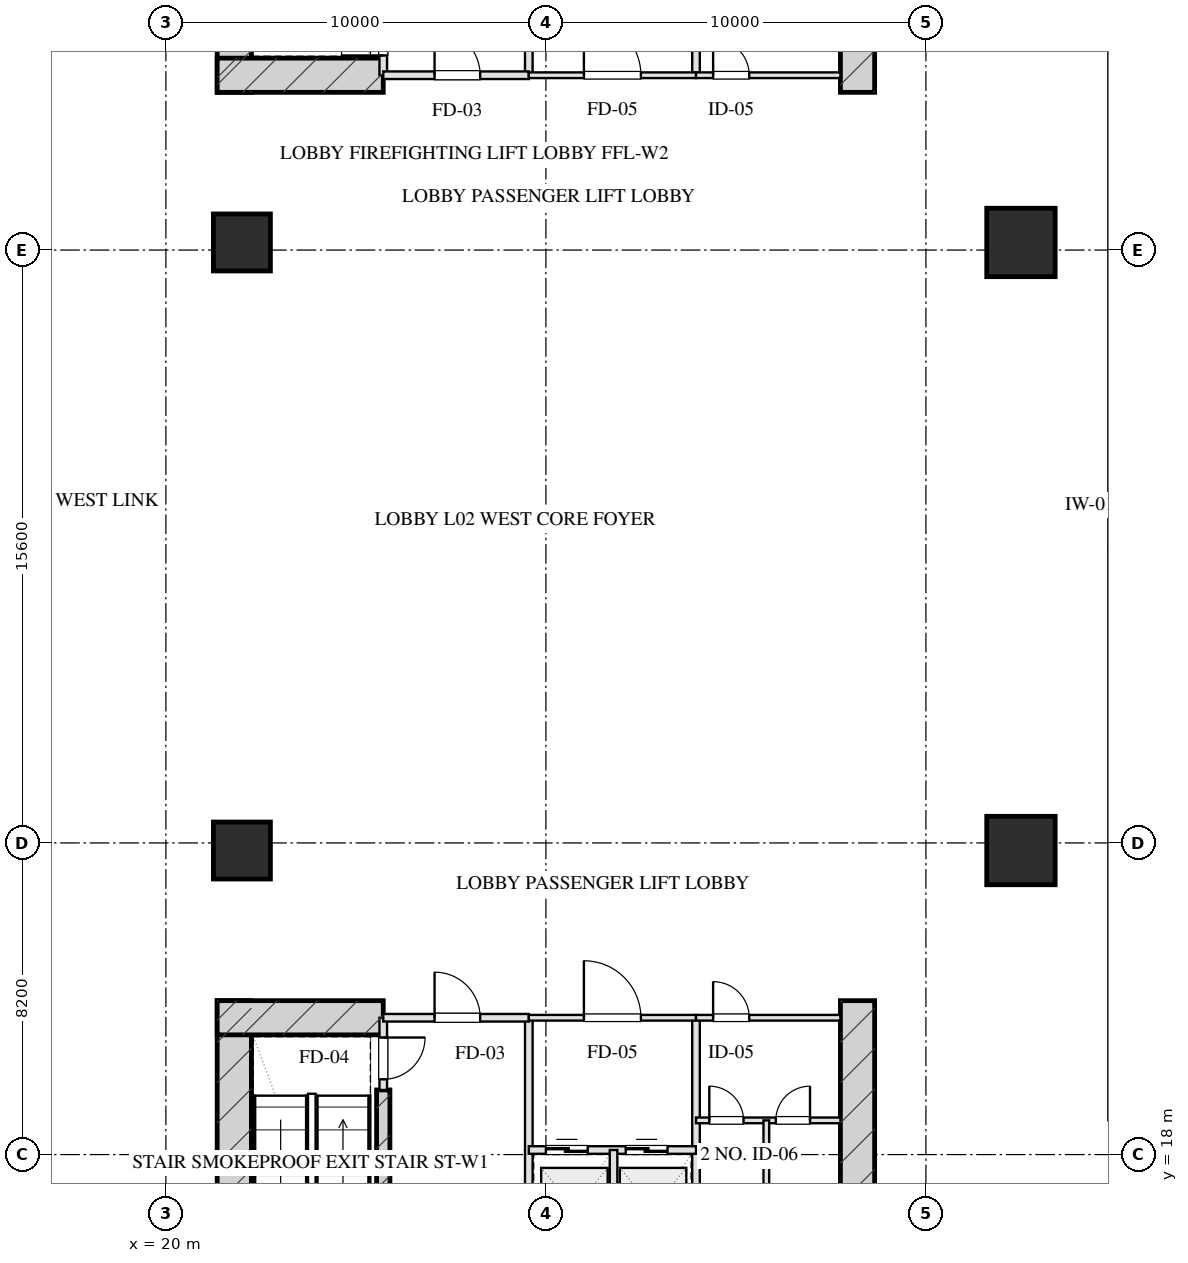
"""IFC4 building model, lengths in metres.
Left out: names, types, materials, properties, quantities, classifications, styles, units other than length and angle.
Written with IfcOpenShell. Run it as: python <this file> out.ifc"""

import sys

from ifc_helpers import new_model, si_unit, direction, frame, frame_2d, origin, origin_2d, place, context, subcontext, project, spatial, rectangle, hollow_rectangle, extrude, element, fill, save


model = new_model("IFC4")
c1 = context("Model", 3, precision=1e-05, world=origin(), true_north=direction((0.0, 1.0)))
c2 = subcontext(c1, "Body", "Model", "MODEL_VIEW")
j1 = project(units=[si_unit("LENGTHUNIT", "METRE"), si_unit("PLANEANGLEUNIT", "RADIAN")], contexts=[c1])
p1 = place(None, origin())
s1 = spatial("IfcSite", under=j1, at=p1, CompositionType="ELEMENT")
p2 = place(p1, origin())
s2 = spatial("IfcBuilding", under=s1, at=p2, CompositionType="ELEMENT")
p3 = place(p2, frame((0.0, 0.0, 11.5)))
s3 = spatial("IfcBuildingStorey", under=s2, at=p3, CompositionType="ELEMENT", Elevation=11.5)
for number, where, z_axis, x_axis in (
    (1, (21.8, 22.05, 0.0), (0.0, 0.0, 1.0), (0.0, -1.0, 0.0)),
    (2, (38.2, 22.05, 0.0), (0.0, 0.0, 1.0), (0.0, -1.0, 0.0)),
):
    element("IfcWall", number, at=place(p3, frame(where, z_axis=z_axis, x_axis=x_axis)), inside=s3, PredefinedType="SHEAR", context=c2, shape_type="SweptSolid", body=[
        extrude(rectangle(XDim=9.78, YDim=0.9, at=frame_2d((4.89, 0.0))), origin(), (0.0, 0.0, 1.0), 5.0),
    ])
p4 = place(p3, frame((25.72, 19.7, 0.0), z_axis=(0.0, 0.0, 1.0), x_axis=(0.0, -1.0, 0.0)))
e3 = element("IfcWall", 3, at=p4, inside=s3, PredefinedType="SHEAR", context=c2, shape_type="SweptSolid", body=[
    extrude(rectangle(XDim=6.98, YDim=0.35, at=frame_2d((3.49, 0.0))), origin(), (0.0, 0.0, 1.0), 5.0),
])
p5 = place(p3, frame((21.35, 21.6, 0.0), z_axis=(0.0, 0.0, 1.0), x_axis=(1.0, 0.0, 0.0)))
e4 = element("IfcWall", 4, at=p5, inside=s3, PredefinedType="SHEAR", context=c2, shape_type="SweptSolid", body=[
    extrude(rectangle(XDim=4.37, YDim=0.9, at=frame_2d((2.185, 0.0))), origin(), (0.0, 0.0, 1.0), 5.0),
])
for number, where, z_axis, x_axis in (
    (5, (21.8, 45.95, 0.0), (0.0, 0.0, 1.0), (0.0, 1.0, 0.0)),
    (6, (38.2, 45.95, 0.0), (0.0, 0.0, 1.0), (0.0, 1.0, 0.0)),
):
    element("IfcWall", number, at=place(p3, frame(where, z_axis=z_axis, x_axis=x_axis)), inside=s3, PredefinedType="SHEAR", context=c2, shape_type="SweptSolid", body=[
        extrude(rectangle(XDim=9.78, YDim=0.9, at=frame_2d((4.89, 0.0))), origin(), (0.0, 0.0, 1.0), 5.0),
    ])
p6 = place(p3, frame((21.35, 46.4, 0.0), z_axis=(0.0, 0.0, 1.0), x_axis=(1.0, 0.0, 0.0)))
e7 = element("IfcWall", 7, at=p6, inside=s3, PredefinedType="SHEAR", context=c2, shape_type="SweptSolid", body=[
    extrude(rectangle(XDim=4.37, YDim=0.9, at=frame_2d((2.185, 0.0))), origin(), (0.0, 0.0, 1.0), 5.0),
])
for number, where, z_axis, x_axis in (
    (8, (22.0, 26.0, 0.0), (0.0, 0.0, 1.0), (1.0, 0.0, 0.0)),
    (9, (22.0, 42.0, 0.0), (0.0, 0.0, 1.0), (1.0, 0.0, 0.0)),
):
    element("IfcColumn", number, at=place(p3, frame(where, z_axis=z_axis, x_axis=x_axis)), inside=s3, PredefinedType="COLUMN", context=c2, shape_type="SweptSolid", body=[
        extrude(rectangle(XDim=1.5, YDim=1.5, at=origin_2d()), origin(), (0.0, 0.0, 1.0), 5.001),
    ])
for number, where, z_axis, x_axis in (
    (10, (42.5, 26.0, 0.0), (0.0, 0.0, 1.0), (1.0, 0.0, 0.0)),
    (11, (42.5, 42.0, 0.0), (0.0, 0.0, 1.0), (1.0, 0.0, 0.0)),
):
    element("IfcColumn", number, at=place(p3, frame(where, z_axis=z_axis, x_axis=x_axis)), inside=s3, PredefinedType="COLUMN", context=c2, shape_type="SweptSolid", body=[
        extrude(hollow_rectangle(XDim=1.8, YDim=1.8, WallThickness=0.06, at=origin_2d()), origin(), (0.0, 0.0, 1.0), 5.001),
    ])
p7 = place(p3, frame((25.72, 21.6, 0.0), z_axis=(0.0, 0.0, 1.0), x_axis=(0.0, -1.0, 0.0)))
e12 = element("IfcWall", 12, at=p7, inside=s3, PredefinedType="PARTITIONING", context=c2, shape_type="SweptSolid", body=[
    extrude(rectangle(XDim=1.9, YDim=0.2, at=frame_2d((0.95, 0.0))), origin(), (0.0, 0.0, 1.0), 4.685),
])
p8 = place(p7, frame((0.52, 0.0, 0.0)))
e13 = element("IfcOpeningElement", 13, at=p8, cuts=e12, PredefinedType="OPENING", context=c2, shape_type="SweptSolid", body=[
    extrude(rectangle(XDim=1.1, YDim=2.05, at=frame_2d((0.55, 1.025))), frame((0.0, 0.11, 0.0), z_axis=(0.0, -1.0, 0.0), x_axis=(1.0, 0.0, 0.0)), (0.0, 0.0, 1.0), 0.22),
])
p9 = place(p3, frame((29.55, 21.6, 0.0), z_axis=(0.0, 0.0, 1.0), x_axis=(0.0, -1.0, 0.0)))
e14 = element("IfcWall", 14, at=p9, inside=s3, PredefinedType="PARTITIONING", context=c2, shape_type="SweptSolid", body=[
    extrude(rectangle(XDim=8.43, YDim=0.2, at=frame_2d((4.215, 0.0))), origin(), (0.0, 0.0, 1.0), 4.685),
])
p10 = place(p3, frame((25.72, 21.6, 0.0), z_axis=(0.0, 0.0, 1.0), x_axis=(1.0, 0.0, 0.0)))
e15 = element("IfcWall", 15, at=p10, inside=s3, PredefinedType="PARTITIONING", context=c2, shape_type="SweptSolid", body=[
    extrude(rectangle(XDim=3.83, YDim=0.2, at=frame_2d((1.915, 0.0))), origin(), (0.0, 0.0, 1.0), 4.685),
])
p11 = place(p10, frame((1.35, 0.0, 0.0)))
e16 = element("IfcOpeningElement", 16, at=p11, cuts=e15, PredefinedType="OPENING", context=c2, shape_type="SweptSolid", body=[
    extrude(rectangle(XDim=1.2, YDim=2.05, at=frame_2d((0.6, 1.025))), frame((0.0, 0.11, 0.0), z_axis=(0.0, -1.0, 0.0), x_axis=(1.0, 0.0, 0.0)), (0.0, 0.0, 1.0), 0.22),
])
p12 = place(p3, frame((33.95, 21.6, 0.0), z_axis=(0.0, 0.0, 1.0), x_axis=(0.0, -1.0, 0.0)))
e17 = element("IfcWall", 17, at=p12, inside=s3, PredefinedType="PARTITIONING", context=c2, shape_type="SweptSolid", body=[
    extrude(rectangle(XDim=8.43, YDim=0.2, at=frame_2d((4.215, 0.0))), origin(), (0.0, 0.0, 1.0), 4.685),
])
p13 = place(p3, frame((29.55, 21.6, 0.0), z_axis=(0.0, 0.0, 1.0), x_axis=(1.0, 0.0, 0.0)))
e18 = element("IfcWall", 18, at=p13, inside=s3, PredefinedType="PARTITIONING", context=c2, shape_type="SweptSolid", body=[
    extrude(rectangle(XDim=4.4, YDim=0.15, at=frame_2d((2.2, 0.0))), origin(), (0.0, 0.0, 1.0), 4.685),
])
p14 = place(p13, frame((1.45, 0.0, 0.0)))
e19 = element("IfcOpeningElement", 19, at=p14, cuts=e18, PredefinedType="OPENING", context=c2, shape_type="SweptSolid", body=[
    extrude(rectangle(XDim=1.5, YDim=2.05, at=frame_2d((0.75, 1.025))), frame((0.0, 0.085, 0.0), z_axis=(0.0, -1.0, 0.0), x_axis=(1.0, 0.0, 0.0)), (0.0, 0.0, 1.0), 0.17),
])
p15 = place(p3, frame((29.55, 18.12, 0.0), z_axis=(0.0, 0.0, 1.0), x_axis=(1.0, 0.0, 0.0)))
e20 = element("IfcWall", 20, at=p15, inside=s3, PredefinedType="PARTITIONING", context=c2, shape_type="SweptSolid", body=[
    extrude(rectangle(XDim=4.4, YDim=0.2, at=frame_2d((2.2, 0.0))), origin(), (0.0, 0.0, 1.0), 4.685),
])
p16 = place(p15, frame((0.45, 0.0, 0.0)))
e21 = element("IfcOpeningElement", 21, at=p16, cuts=e20, PredefinedType="OPENING", context=c2, shape_type="SweptSolid", body=[
    extrude(rectangle(XDim=1.1, YDim=2.05, at=frame_2d((0.55, 1.025))), frame((0.0, 0.11, 0.0), z_axis=(0.0, -1.0, 0.0), x_axis=(1.0, 0.0, 0.0)), (0.0, 0.0, 1.0), 0.22),
])
p17 = place(p15, frame((2.55, 0.0, 0.0)))
e22 = element("IfcOpeningElement", 22, at=p17, cuts=e20, PredefinedType="OPENING", context=c2, shape_type="SweptSolid", body=[
    extrude(rectangle(XDim=1.1, YDim=2.05, at=frame_2d((0.55, 1.025))), frame((0.0, 0.11, 0.0), z_axis=(0.0, -1.0, 0.0), x_axis=(1.0, 0.0, 0.0)), (0.0, 0.0, 1.0), 0.22),
])
p18 = place(p3, frame((31.78, 18.12, 0.0), z_axis=(0.0, 0.0, 1.0), x_axis=(0.0, -1.0, 0.0)))
e23 = element("IfcWall", 23, at=p18, inside=s3, PredefinedType="PARTITIONING", context=c2, shape_type="SweptSolid", body=[
    extrude(rectangle(XDim=4.95, YDim=0.2, at=frame_2d((2.475, 0.0))), origin(), (0.0, 0.0, 1.0), 4.685),
])
p19 = place(p3, frame((33.95, 21.6, 0.0), z_axis=(0.0, 0.0, 1.0), x_axis=(1.0, 0.0, 0.0)))
e24 = element("IfcWall", 24, at=p19, inside=s3, PredefinedType="PARTITIONING", context=c2, shape_type="SweptSolid", body=[
    extrude(rectangle(XDim=3.8, YDim=0.15, at=frame_2d((1.9, 0.0))), origin(), (0.0, 0.0, 1.0), 4.685),
])
p20 = place(p19, frame((0.45, 0.0, 0.0)))
e25 = element("IfcOpeningElement", 25, at=p20, cuts=e24, PredefinedType="OPENING", context=c2, shape_type="SweptSolid", body=[
    extrude(rectangle(XDim=0.95, YDim=2.05, at=frame_2d((0.475, 1.025))), frame((0.0, 0.085, 0.0), z_axis=(0.0, -1.0, 0.0), x_axis=(1.0, 0.0, 0.0)), (0.0, 0.0, 1.0), 0.17),
])
p21 = place(p3, frame((33.95, 18.9, 0.0), z_axis=(0.0, 0.0, 1.0), x_axis=(1.0, 0.0, 0.0)))
e26 = element("IfcWall", 26, at=p21, inside=s3, PredefinedType="PARTITIONING", context=c2, shape_type="SweptSolid", body=[
    extrude(rectangle(XDim=3.8, YDim=0.15, at=frame_2d((1.9, 0.0))), origin(), (0.0, 0.0, 1.0), 4.685),
])
p22 = place(p21, frame((0.35, 0.0, 0.0)))
e27 = element("IfcOpeningElement", 27, at=p22, cuts=e26, PredefinedType="OPENING", context=c2, shape_type="SweptSolid", body=[
    extrude(rectangle(XDim=0.9, YDim=2.05, at=frame_2d((0.45, 1.025))), frame((0.0, 0.085, 0.0), z_axis=(0.0, -1.0, 0.0), x_axis=(1.0, 0.0, 0.0)), (0.0, 0.0, 1.0), 0.17),
])
p23 = place(p21, frame((2.1, 0.0, 0.0)))
e28 = element("IfcOpeningElement", 28, at=p23, cuts=e26, PredefinedType="OPENING", context=c2, shape_type="SweptSolid", body=[
    extrude(rectangle(XDim=0.9, YDim=2.05, at=frame_2d((0.45, 1.025))), frame((0.0, 0.085, 0.0), z_axis=(0.0, -1.0, 0.0), x_axis=(1.0, 0.0, 0.0)), (0.0, 0.0, 1.0), 0.17),
])
p24 = place(p3, frame((35.8, 18.9, 0.0), z_axis=(0.0, 0.0, 1.0), x_axis=(0.0, -1.0, 0.0)))
e29 = element("IfcWall", 29, at=p24, inside=s3, PredefinedType="PARTITIONING", context=c2, shape_type="SweptSolid", body=[
    extrude(rectangle(XDim=5.73, YDim=0.15, at=frame_2d((2.865, 0.0))), origin(), (0.0, 0.0, 1.0), 4.685),
])
p25 = place(p3, frame((25.72, 46.4, 0.0), z_axis=(0.0, 0.0, 1.0), x_axis=(0.0, 1.0, 0.0)))
e30 = element("IfcWall", 30, at=p25, inside=s3, PredefinedType="PARTITIONING", context=c2, shape_type="SweptSolid", body=[
    extrude(rectangle(XDim=1.9, YDim=0.2, at=frame_2d((0.95, 0.0))), origin(), (0.0, 0.0, 1.0), 4.685),
])
p26 = place(p25, frame((0.52, 0.0, 0.0)))
e31 = element("IfcOpeningElement", 31, at=p26, cuts=e30, PredefinedType="OPENING", context=c2, shape_type="SweptSolid", body=[
    extrude(rectangle(XDim=1.1, YDim=2.05, at=frame_2d((0.55, 1.025))), frame((0.0, 0.11, 0.0), z_axis=(0.0, -1.0, 0.0), x_axis=(1.0, 0.0, 0.0)), (0.0, 0.0, 1.0), 0.22),
])
p27 = place(p3, frame((29.55, 46.4, 0.0), z_axis=(0.0, 0.0, 1.0), x_axis=(0.0, 1.0, 0.0)))
e32 = element("IfcWall", 32, at=p27, inside=s3, PredefinedType="PARTITIONING", context=c2, shape_type="SweptSolid", body=[
    extrude(rectangle(XDim=8.43, YDim=0.2, at=frame_2d((4.215, 0.0))), origin(), (0.0, 0.0, 1.0), 4.685),
])
p28 = place(p3, frame((25.72, 46.4, 0.0), z_axis=(0.0, 0.0, 1.0), x_axis=(1.0, 0.0, 0.0)))
e33 = element("IfcWall", 33, at=p28, inside=s3, PredefinedType="PARTITIONING", context=c2, shape_type="SweptSolid", body=[
    extrude(rectangle(XDim=3.83, YDim=0.2, at=frame_2d((1.915, 0.0))), origin(), (0.0, 0.0, 1.0), 4.685),
])
p29 = place(p28, frame((1.35, 0.0, 0.0)))
e34 = element("IfcOpeningElement", 34, at=p29, cuts=e33, PredefinedType="OPENING", context=c2, shape_type="SweptSolid", body=[
    extrude(rectangle(XDim=1.2, YDim=2.05, at=frame_2d((0.6, 1.025))), frame((0.0, 0.11, 0.0), z_axis=(0.0, -1.0, 0.0), x_axis=(1.0, 0.0, 0.0)), (0.0, 0.0, 1.0), 0.22),
])
p30 = place(p3, frame((33.95, 46.4, 0.0), z_axis=(0.0, 0.0, 1.0), x_axis=(0.0, 1.0, 0.0)))
e35 = element("IfcWall", 35, at=p30, inside=s3, PredefinedType="PARTITIONING", context=c2, shape_type="SweptSolid", body=[
    extrude(rectangle(XDim=8.43, YDim=0.2, at=frame_2d((4.215, 0.0))), origin(), (0.0, 0.0, 1.0), 4.685),
])
p31 = place(p3, frame((29.55, 46.4, 0.0), z_axis=(0.0, 0.0, 1.0), x_axis=(1.0, 0.0, 0.0)))
e36 = element("IfcWall", 36, at=p31, inside=s3, PredefinedType="PARTITIONING", context=c2, shape_type="SweptSolid", body=[
    extrude(rectangle(XDim=4.4, YDim=0.15, at=frame_2d((2.2, 0.0))), origin(), (0.0, 0.0, 1.0), 4.685),
])
p32 = place(p31, frame((1.45, 0.0, 0.0)))
e37 = element("IfcOpeningElement", 37, at=p32, cuts=e36, PredefinedType="OPENING", context=c2, shape_type="SweptSolid", body=[
    extrude(rectangle(XDim=1.5, YDim=2.05, at=frame_2d((0.75, 1.025))), frame((0.0, 0.085, 0.0), z_axis=(0.0, -1.0, 0.0), x_axis=(1.0, 0.0, 0.0)), (0.0, 0.0, 1.0), 0.17),
])
p33 = place(p3, frame((33.95, 46.4, 0.0), z_axis=(0.0, 0.0, 1.0), x_axis=(1.0, 0.0, 0.0)))
e38 = element("IfcWall", 38, at=p33, inside=s3, PredefinedType="PARTITIONING", context=c2, shape_type="SweptSolid", body=[
    extrude(rectangle(XDim=3.8, YDim=0.15, at=frame_2d((1.9, 0.0))), origin(), (0.0, 0.0, 1.0), 4.685),
])
p34 = place(p33, frame((0.45, 0.0, 0.0)))
e39 = element("IfcOpeningElement", 39, at=p34, cuts=e38, PredefinedType="OPENING", context=c2, shape_type="SweptSolid", body=[
    extrude(rectangle(XDim=0.95, YDim=2.05, at=frame_2d((0.475, 1.025))), frame((0.0, 0.085, 0.0), z_axis=(0.0, -1.0, 0.0), x_axis=(1.0, 0.0, 0.0)), (0.0, 0.0, 1.0), 0.17),
])
p35 = place(p3, frame((44.9, 18.9, 0.0), z_axis=(0.0, 0.0, 1.0), x_axis=(0.0, 1.0, 0.0)))
e40 = element("IfcWall", 40, at=p35, inside=s3, PredefinedType="PARTITIONING", context=c2, shape_type="SweptSolid", body=[
    extrude(rectangle(XDim=30.2, YDim=0.2, at=frame_2d((15.1, 0.0))), origin(), (0.0, 0.0, 1.0), 4.685),
])
p36 = place(p8, origin())
e41 = element("IfcDoor", 41, at=p36, inside=s3, OperationType="SINGLE_SWING_LEFT", PredefinedType="DOOR", context=c2, shape_type="SweptSolid", body=[
    extrude(rectangle(XDim=1.1, YDim=2.05, at=frame_2d((0.55, 1.025))), frame((0.0, 0.025, 0.0), z_axis=(0.0, -1.0, 0.0), x_axis=(1.0, 0.0, 0.0)), (0.0, 0.0, 1.0), 0.05),
])
fill(e13, e41)
p37 = place(p11, origin())
e42 = element("IfcDoor", 42, at=p37, inside=s3, OperationType="SINGLE_SWING_LEFT", PredefinedType="DOOR", context=c2, shape_type="SweptSolid", body=[
    extrude(rectangle(XDim=1.2, YDim=2.05, at=frame_2d((0.6, 1.025))), frame((0.0, 0.025, 0.0), z_axis=(0.0, -1.0, 0.0), x_axis=(1.0, 0.0, 0.0)), (0.0, 0.0, 1.0), 0.05),
])
fill(e16, e42)
p38 = place(p14, origin())
e43 = element("IfcDoor", 43, at=p38, inside=s3, OperationType="SINGLE_SWING_LEFT", PredefinedType="DOOR", context=c2, shape_type="SweptSolid", body=[
    extrude(rectangle(XDim=1.5, YDim=2.05, at=frame_2d((0.75, 1.025))), frame((0.0, 0.025, 0.0), z_axis=(0.0, -1.0, 0.0), x_axis=(1.0, 0.0, 0.0)), (0.0, 0.0, 1.0), 0.05),
])
fill(e19, e43)
p39 = place(p16, origin())
e44 = element("IfcDoor", 44, at=p39, inside=s3, OperationType="DOUBLE_DOOR_SLIDING", PredefinedType="DOOR", context=c2, shape_type="SweptSolid", body=[
    extrude(rectangle(XDim=1.1, YDim=2.05, at=frame_2d((0.55, 1.025))), frame((0.0, 0.025, 0.0), z_axis=(0.0, -1.0, 0.0), x_axis=(1.0, 0.0, 0.0)), (0.0, 0.0, 1.0), 0.05),
])
fill(e21, e44)
p40 = place(p17, origin())
e45 = element("IfcDoor", 45, at=p40, inside=s3, OperationType="DOUBLE_DOOR_SLIDING", PredefinedType="DOOR", context=c2, shape_type="SweptSolid", body=[
    extrude(rectangle(XDim=1.1, YDim=2.05, at=frame_2d((0.55, 1.025))), frame((0.0, 0.025, 0.0), z_axis=(0.0, -1.0, 0.0), x_axis=(1.0, 0.0, 0.0)), (0.0, 0.0, 1.0), 0.05),
])
fill(e22, e45)
p41 = place(p20, origin())
e46 = element("IfcDoor", 46, at=p41, inside=s3, OperationType="SINGLE_SWING_LEFT", PredefinedType="DOOR", context=c2, shape_type="SweptSolid", body=[
    extrude(rectangle(XDim=0.95, YDim=2.05, at=frame_2d((0.475, 1.025))), frame((0.0, 0.025, 0.0), z_axis=(0.0, -1.0, 0.0), x_axis=(1.0, 0.0, 0.0)), (0.0, 0.0, 1.0), 0.05),
])
fill(e25, e46)
p42 = place(p22, origin())
e47 = element("IfcDoor", 47, at=p42, inside=s3, OperationType="SINGLE_SWING_LEFT", PredefinedType="DOOR", context=c2, shape_type="SweptSolid", body=[
    extrude(rectangle(XDim=0.9, YDim=2.05, at=frame_2d((0.45, 1.025))), frame((0.0, 0.025, 0.0), z_axis=(0.0, -1.0, 0.0), x_axis=(1.0, 0.0, 0.0)), (0.0, 0.0, 1.0), 0.05),
])
fill(e27, e47)
p43 = place(p23, origin())
e48 = element("IfcDoor", 48, at=p43, inside=s3, OperationType="SINGLE_SWING_RIGHT", PredefinedType="DOOR", context=c2, shape_type="SweptSolid", body=[
    extrude(rectangle(XDim=0.9, YDim=2.05, at=frame_2d((0.45, 1.025))), frame((0.0, 0.025, 0.0), z_axis=(0.0, -1.0, 0.0), x_axis=(1.0, 0.0, 0.0)), (0.0, 0.0, 1.0), 0.05),
])
fill(e28, e48)
p44 = place(p26, origin())
e49 = element("IfcDoor", 49, at=p44, inside=s3, OperationType="SINGLE_SWING_LEFT", PredefinedType="DOOR", context=c2, shape_type="SweptSolid", body=[
    extrude(rectangle(XDim=1.1, YDim=2.05, at=frame_2d((0.55, 1.025))), frame((0.0, 0.025, 0.0), z_axis=(0.0, -1.0, 0.0), x_axis=(1.0, 0.0, 0.0)), (0.0, 0.0, 1.0), 0.05),
])
fill(e31, e49)
p45 = place(p29, origin())
e50 = element("IfcDoor", 50, at=p45, inside=s3, OperationType="SINGLE_SWING_LEFT", PredefinedType="DOOR", context=c2, shape_type="SweptSolid", body=[
    extrude(rectangle(XDim=1.2, YDim=2.05, at=frame_2d((0.6, 1.025))), frame((0.0, 0.025, 0.0), z_axis=(0.0, -1.0, 0.0), x_axis=(1.0, 0.0, 0.0)), (0.0, 0.0, 1.0), 0.05),
])
fill(e34, e50)
p46 = place(p32, origin())
e51 = element("IfcDoor", 51, at=p46, inside=s3, OperationType="SINGLE_SWING_LEFT", PredefinedType="DOOR", context=c2, shape_type="SweptSolid", body=[
    extrude(rectangle(XDim=1.5, YDim=2.05, at=frame_2d((0.75, 1.025))), frame((0.0, 0.025, 0.0), z_axis=(0.0, -1.0, 0.0), x_axis=(1.0, 0.0, 0.0)), (0.0, 0.0, 1.0), 0.05),
])
fill(e37, e51)
p47 = place(p34, origin())
e52 = element("IfcDoor", 52, at=p47, inside=s3, OperationType="SINGLE_SWING_LEFT", PredefinedType="DOOR", context=c2, shape_type="SweptSolid", body=[
    extrude(rectangle(XDim=0.95, YDim=2.05, at=frame_2d((0.475, 1.025))), frame((0.0, 0.025, 0.0), z_axis=(0.0, -1.0, 0.0), x_axis=(1.0, 0.0, 0.0)), (0.0, 0.0, 1.0), 0.05),
])
fill(e39, e52)
save(model, sys.argv[1])
